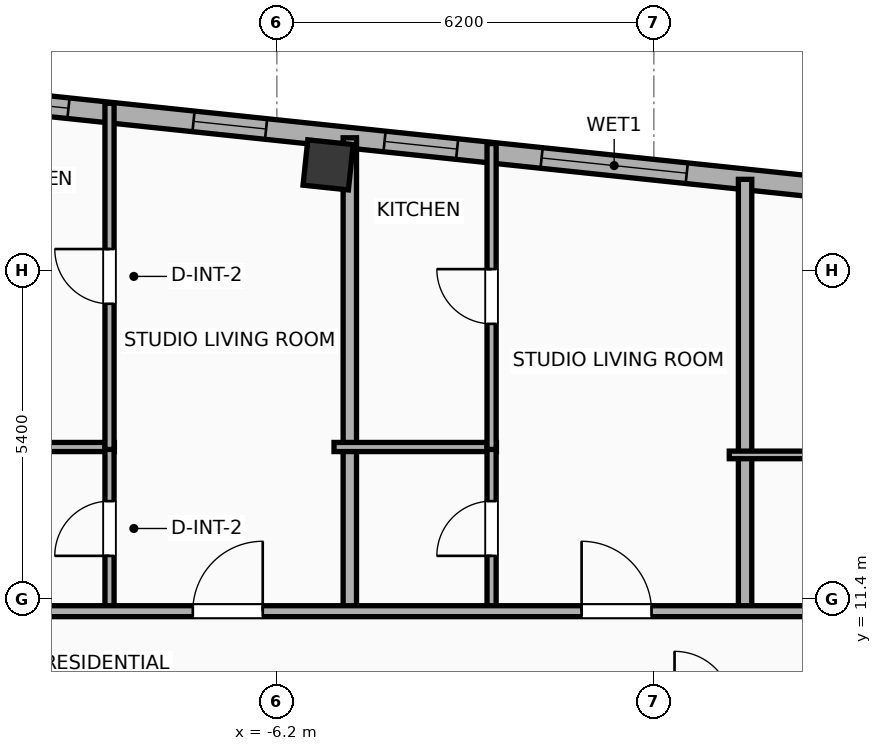
"""IFC4 building model, lengths in metres.
Left out: names, types, materials, properties, quantities, classifications, styles, units other than length and angle.
Written with IfcOpenShell. Run it as: python <this file> out.ifc"""

import sys

from ifc_helpers import new_model, si_unit, direction, frame, frame_2d, origin, origin_2d, place, context, subcontext, project, spatial, rectangle, hollow_rectangle, extrude, element, fill, save


model = new_model("IFC4")
c1 = context("Model", 3, precision=1e-05, world=origin(), true_north=direction((0.0, 1.0)))
c2 = subcontext(c1, "Body", "Model", "MODEL_VIEW")
j1 = project(units=[si_unit("LENGTHUNIT", "METRE"), si_unit("PLANEANGLEUNIT", "RADIAN")], contexts=[c1])
p1 = place(None, origin())
s1 = spatial("IfcSite", under=j1, at=p1, CompositionType="ELEMENT")
p2 = place(p1, origin())
s2 = spatial("IfcBuilding", under=s1, at=p2, CompositionType="ELEMENT")
p3 = place(p2, frame((0.0, 0.0, 287.3)))
s3 = spatial("IfcBuildingStorey", under=s2, at=p3, CompositionType="ELEMENT", Elevation=287.3)
p4 = place(p3, frame((-5.357, 18.54, 0.0), z_axis=(0.0, 0.0, 1.0), x_axis=(0.994521895368, -0.104528463268, 0.0)))
e1 = element("IfcColumn", 1, at=p4, inside=s3, PredefinedType="COLUMN", context=c2, shape_type="SweptSolid", body=[
    extrude(hollow_rectangle(XDim=0.75, YDim=0.75, WallThickness=0.025, at=origin_2d()), origin(), (0.0, 0.0, 1.0), 3.9),
])
p5 = place(p3, frame((-23.908, 20.972, 0.0), z_axis=(0.0, 0.0, 1.0), x_axis=(0.994521888554, -0.104528528102, 0.0)))
e2 = element("IfcWall", 2, at=p5, inside=s3, PredefinedType="ELEMENTEDWALL", context=c2, shape_type="SweptSolid", body=[
    extrude(rectangle(XDim=46.766, YDim=0.34, at=frame_2d((23.383, 0.0))), origin(), (0.0, 0.0, 1.0), 3.635),
])
p6 = place(p5, frame((22.183, 0.0, 0.75)))
e3 = element("IfcOpeningElement", 3, at=p6, cuts=e2, PredefinedType="OPENING", context=c2, shape_type="SweptSolid", body=[
    extrude(rectangle(XDim=2.4, YDim=2.1, at=frame_2d((1.2, 1.05))), frame((0.0, 0.18, 0.0), z_axis=(0.0, -1.0, 0.0), x_axis=(1.0, 0.0, 0.0)), (0.0, 0.0, 1.0), 0.36),
])
p7 = place(p5, frame((4.49, 0.0, 0.75)))
e4 = element("IfcOpeningElement", 4, at=p7, cuts=e2, PredefinedType="OPENING", context=c2, shape_type="SweptSolid", body=[
    extrude(rectangle(XDim=1.2, YDim=2.05, at=frame_2d((0.6, 1.025))), frame((0.0, 0.18, 0.0), z_axis=(0.0, -1.0, 0.0), x_axis=(1.0, 0.0, 0.0)), (0.0, 0.0, 1.0), 0.36),
])
p8 = place(p5, frame((1.657, 0.0, 0.75)))
e5 = element("IfcOpeningElement", 5, at=p8, cuts=e2, PredefinedType="OPENING", context=c2, shape_type="SweptSolid", body=[
    extrude(rectangle(XDim=1.2, YDim=2.05, at=frame_2d((0.6, 1.025))), frame((0.0, 0.18, 0.0), z_axis=(0.0, -1.0, 0.0), x_axis=(1.0, 0.0, 0.0)), (0.0, 0.0, 1.0), 0.36),
])
p9 = place(p5, frame((9.885, 0.0, 0.75)))
e6 = element("IfcOpeningElement", 6, at=p9, cuts=e2, PredefinedType="OPENING", context=c2, shape_type="SweptSolid", body=[
    extrude(rectangle(XDim=1.2, YDim=2.05, at=frame_2d((0.6, 1.025))), frame((0.0, 0.18, 0.0), z_axis=(0.0, -1.0, 0.0), x_axis=(1.0, 0.0, 0.0)), (0.0, 0.0, 1.0), 0.36),
])
p10 = place(p5, frame((16.427, 0.0, 0.75)))
e7 = element("IfcOpeningElement", 7, at=p10, cuts=e2, PredefinedType="OPENING", context=c2, shape_type="SweptSolid", body=[
    extrude(rectangle(XDim=1.2, YDim=2.05, at=frame_2d((0.6, 1.025))), frame((0.0, 0.18, 0.0), z_axis=(0.0, -1.0, 0.0), x_axis=(1.0, 0.0, 0.0)), (0.0, 0.0, 1.0), 0.36),
])
p11 = place(p5, frame((13.159, 0.0, 0.75)))
e8 = element("IfcOpeningElement", 8, at=p11, cuts=e2, PredefinedType="OPENING", context=c2, shape_type="SweptSolid", body=[
    extrude(rectangle(XDim=1.2, YDim=2.05, at=frame_2d((0.6, 1.025))), frame((0.0, 0.18, 0.0), z_axis=(0.0, -1.0, 0.0), x_axis=(1.0, 0.0, 0.0)), (0.0, 0.0, 1.0), 0.36),
])
p12 = place(p5, frame((19.586, 0.0, 0.75)))
e9 = element("IfcOpeningElement", 9, at=p12, cuts=e2, PredefinedType="OPENING", context=c2, shape_type="SweptSolid", body=[
    extrude(rectangle(XDim=1.2, YDim=2.05, at=frame_2d((0.6, 1.025))), frame((0.0, 0.18, 0.0), z_axis=(0.0, -1.0, 0.0), x_axis=(1.0, 0.0, 0.0)), (0.0, 0.0, 1.0), 0.36),
])
p13 = place(p5, frame((28.687, 0.0, 0.75)))
e10 = element("IfcOpeningElement", 10, at=p13, cuts=e2, PredefinedType="OPENING", context=c2, shape_type="SweptSolid", body=[
    extrude(rectangle(XDim=1.2, YDim=2.05, at=frame_2d((0.6, 1.025))), frame((0.0, 0.18, 0.0), z_axis=(0.0, -1.0, 0.0), x_axis=(1.0, 0.0, 0.0)), (0.0, 0.0, 1.0), 0.36),
])
p14 = place(p5, frame((34.0, 0.0, 0.75)))
e11 = element("IfcOpeningElement", 11, at=p14, cuts=e2, PredefinedType="OPENING", context=c2, shape_type="SweptSolid", body=[
    extrude(rectangle(XDim=1.2, YDim=2.05, at=frame_2d((0.6, 1.025))), frame((0.0, 0.18, 0.0), z_axis=(0.0, -1.0, 0.0), x_axis=(1.0, 0.0, 0.0)), (0.0, 0.0, 1.0), 0.36),
])
p15 = place(p5, frame((38.775, 0.0, 0.75)))
e12 = element("IfcOpeningElement", 12, at=p15, cuts=e2, PredefinedType="OPENING", context=c2, shape_type="SweptSolid", body=[
    extrude(rectangle(XDim=1.2, YDim=2.05, at=frame_2d((0.6, 1.025))), frame((0.0, 0.18, 0.0), z_axis=(0.0, -1.0, 0.0), x_axis=(1.0, 0.0, 0.0)), (0.0, 0.0, 1.0), 0.36),
])
p16 = place(p5, frame((41.836, 0.0, 0.75)))
e13 = element("IfcOpeningElement", 13, at=p16, cuts=e2, PredefinedType="OPENING", context=c2, shape_type="SweptSolid", body=[
    extrude(rectangle(XDim=1.2, YDim=2.05, at=frame_2d((0.6, 1.025))), frame((0.0, 0.18, 0.0), z_axis=(0.0, -1.0, 0.0), x_axis=(1.0, 0.0, 0.0)), (0.0, 0.0, 1.0), 0.36),
])
p17 = place(p5, frame((44.206, 0.0, 0.75)))
e14 = element("IfcOpeningElement", 14, at=p17, cuts=e2, PredefinedType="OPENING", context=c2, shape_type="SweptSolid", body=[
    extrude(rectangle(XDim=1.2, YDim=2.05, at=frame_2d((0.6, 1.025))), frame((0.0, 0.18, 0.0), z_axis=(0.0, -1.0, 0.0), x_axis=(1.0, 0.0, 0.0)), (0.0, 0.0, 1.0), 0.36),
])
p18 = place(p3, frame((-11.76, 13.9, 0.0), z_axis=(0.0, 0.0, 1.0), x_axis=(1.0, 0.0, 0.0)))
e15 = element("IfcWall", 15, at=p18, inside=s3, PredefinedType="PLUMBINGWALL", context=c2, shape_type="SweptSolid", body=[
    extrude(rectangle(XDim=2.888, YDim=0.15, at=frame_2d((1.444, 0.0))), origin(), (0.0, 0.0, 1.0), 3.635),
])
p19 = place(p3, frame((-8.952, 11.18, 0.0), z_axis=(0.0, 0.0, 1.0), x_axis=(0.0, 1.0, 0.0)))
e16 = element("IfcWall", 16, at=p19, inside=s3, PredefinedType="PLUMBINGWALL", context=c2, shape_type="SweptSolid", body=[
    extrude(rectangle(XDim=2.76, YDim=0.15, at=frame_2d((1.38, 0.0))), origin(), (0.0, 0.0, 1.0), 3.635),
])
p20 = place(p19, frame((0.93, 0.0, 0.0)))
e17 = element("IfcOpeningElement", 17, at=p20, cuts=e16, PredefinedType="OPENING", context=c2, shape_type="SweptSolid", body=[
    extrude(rectangle(XDim=0.9, YDim=2.05, at=frame_2d((0.45, 1.025))), frame((0.0, 0.085, 0.0), z_axis=(0.0, -1.0, 0.0), x_axis=(1.0, 0.0, 0.0)), (0.0, 0.0, 1.0), 0.17),
])
p21 = place(p3, frame((-8.952, 13.86, 0.0), z_axis=(0.0, 0.0, 1.0), x_axis=(0.0, 1.0, 0.0)))
e18 = element("IfcWall", 18, at=p21, inside=s3, PredefinedType="PLUMBINGWALL", context=c2, shape_type="SweptSolid", body=[
    extrude(rectangle(XDim=5.691, YDim=0.15, at=frame_2d((2.845, 0.0))), origin(), (0.0, 0.0, 1.0), 3.635),
])
p22 = place(p21, frame((2.396, 0.0, 0.0)))
e19 = element("IfcOpeningElement", 19, at=p22, cuts=e18, PredefinedType="OPENING", context=c2, shape_type="SweptSolid", body=[
    extrude(rectangle(XDim=0.9, YDim=2.05, at=frame_2d((0.45, 1.025))), frame((0.0, 0.085, 0.0), z_axis=(0.0, -1.0, 0.0), x_axis=(1.0, 0.0, 0.0)), (0.0, 0.0, 1.0), 0.17),
])
p23 = place(p3, frame((-5.0, 11.12, 0.0), z_axis=(0.0, 0.0, 1.0), x_axis=(0.0, 1.0, 0.0)))
e20 = element("IfcWall", 20, at=p23, inside=s3, PredefinedType="PARTITIONING", context=c2, shape_type="SweptSolid", body=[
    extrude(rectangle(XDim=7.865, YDim=0.22, at=frame_2d((3.932, 0.0))), origin(), (0.0, 0.0, 1.0), 3.075),
])
p24 = place(p3, frame((-5.26, 13.9, 0.0), z_axis=(0.0, 0.0, 1.0), x_axis=(1.0, 0.0, 0.0)))
e21 = element("IfcWall", 21, at=p24, inside=s3, PredefinedType="PLUMBINGWALL", context=c2, shape_type="SweptSolid", body=[
    extrude(rectangle(XDim=2.671, YDim=0.15, at=frame_2d((1.335, 0.0))), origin(), (0.0, 0.0, 1.0), 3.635),
])
p25 = place(p3, frame((-2.669, 11.18, 0.0), z_axis=(0.0, 0.0, 1.0), x_axis=(0.0, 1.0, 0.0)))
e22 = element("IfcWall", 22, at=p25, inside=s3, PredefinedType="PLUMBINGWALL", context=c2, shape_type="SweptSolid", body=[
    extrude(rectangle(XDim=2.76, YDim=0.15, at=frame_2d((1.38, 0.0))), origin(), (0.0, 0.0, 1.0), 3.635),
])
p26 = place(p25, frame((0.93, 0.0, 0.0)))
e23 = element("IfcOpeningElement", 23, at=p26, cuts=e22, PredefinedType="OPENING", context=c2, shape_type="SweptSolid", body=[
    extrude(rectangle(XDim=0.9, YDim=2.05, at=frame_2d((0.45, 1.025))), frame((0.0, 0.085, 0.0), z_axis=(0.0, -1.0, 0.0), x_axis=(1.0, 0.0, 0.0)), (0.0, 0.0, 1.0), 0.17),
])
p27 = place(p3, frame((-2.669, 13.86, 0.0), z_axis=(0.0, 0.0, 1.0), x_axis=(0.0, 1.0, 0.0)))
e24 = element("IfcWall", 24, at=p27, inside=s3, PredefinedType="PLUMBINGWALL", context=c2, shape_type="SweptSolid", body=[
    extrude(rectangle(XDim=5.031, YDim=0.15, at=frame_2d((2.515, 0.0))), origin(), (0.0, 0.0, 1.0), 3.635),
])
p28 = place(p27, frame((2.065, 0.0, 0.0)))
e25 = element("IfcOpeningElement", 25, at=p28, cuts=e24, PredefinedType="OPENING", context=c2, shape_type="SweptSolid", body=[
    extrude(rectangle(XDim=0.9, YDim=2.05, at=frame_2d((0.45, 1.025))), frame((0.0, 0.085, 0.0), z_axis=(0.0, -1.0, 0.0), x_axis=(1.0, 0.0, 0.0)), (0.0, 0.0, 1.0), 0.17),
])
p29 = place(p3, frame((1.5, 11.12, 0.0), z_axis=(0.0, 0.0, 1.0), x_axis=(0.0, 1.0, 0.0)))
e26 = element("IfcWall", 26, at=p29, inside=s3, PredefinedType="PARTITIONING", context=c2, shape_type="SweptSolid", body=[
    extrude(rectangle(XDim=7.182, YDim=0.22, at=frame_2d((3.591, 0.0))), origin(), (0.0, 0.0, 1.0), 3.635),
])
p30 = place(p3, frame((1.24, 13.77, 0.0), z_axis=(0.0, 0.0, 1.0), x_axis=(1.0, 0.0, 0.0)))
e27 = element("IfcWall", 27, at=p30, inside=s3, PredefinedType="PARTITIONING", context=c2, shape_type="SweptSolid", body=[
    extrude(rectangle(XDim=2.63, YDim=0.125, at=frame_2d((1.315, 0.0))), origin(), (0.0, 0.0, 1.0), 3.635),
])
p31 = place(p3, frame((-28.401, 11.2, 0.0), z_axis=(0.0, 0.0, 1.0), x_axis=(1.0, 0.0, 0.0)))
e28 = element("IfcWall", 28, at=p31, inside=s3, PredefinedType="PARTITIONING", context=c2, shape_type="SweptSolid", body=[
    extrude(rectangle(XDim=53.956, YDim=0.18, at=frame_2d((26.978, 0.0))), origin(), (0.0, 0.0, 1.0), 3.635),
])
p32 = place(p31, frame((2.512, 0.0, 0.0)))
e29 = element("IfcOpeningElement", 29, at=p32, cuts=e28, PredefinedType="OPENING", context=c2, shape_type="SweptSolid", body=[
    extrude(rectangle(XDim=0.9, YDim=2.05, at=frame_2d((0.45, 1.025))), frame((0.0, 0.1, 0.0), z_axis=(0.0, -1.0, 0.0), x_axis=(1.0, 0.0, 0.0)), (0.0, 0.0, 1.0), 0.2),
])
p33 = place(p31, frame((8.948, 0.0, 0.0)))
e30 = element("IfcOpeningElement", 30, at=p33, cuts=e28, PredefinedType="OPENING", context=c2, shape_type="SweptSolid", body=[
    extrude(rectangle(XDim=1.15, YDim=2.05, at=frame_2d((0.575, 1.025))), frame((0.0, 0.1, 0.0), z_axis=(0.0, -1.0, 0.0), x_axis=(1.0, 0.0, 0.0)), (0.0, 0.0, 1.0), 0.2),
])
p34 = place(p31, frame((13.821, 0.0, 0.0)))
e31 = element("IfcOpeningElement", 31, at=p34, cuts=e28, PredefinedType="OPENING", context=c2, shape_type="SweptSolid", body=[
    extrude(rectangle(XDim=0.9, YDim=2.05, at=frame_2d((0.45, 1.025))), frame((0.0, 0.1, 0.0), z_axis=(0.0, -1.0, 0.0), x_axis=(1.0, 0.0, 0.0)), (0.0, 0.0, 1.0), 0.2),
])
p35 = place(p31, frame((20.818, 0.0, 0.0)))
e32 = element("IfcOpeningElement", 32, at=p35, cuts=e28, PredefinedType="OPENING", context=c2, shape_type="SweptSolid", body=[
    extrude(rectangle(XDim=1.15, YDim=2.05, at=frame_2d((0.575, 1.025))), frame((0.0, 0.1, 0.0), z_axis=(0.0, -1.0, 0.0), x_axis=(1.0, 0.0, 0.0)), (0.0, 0.0, 1.0), 0.2),
])
p36 = place(p31, frame((27.212, 0.0, 0.0)))
e33 = element("IfcOpeningElement", 33, at=p36, cuts=e28, PredefinedType="OPENING", context=c2, shape_type="SweptSolid", body=[
    extrude(rectangle(XDim=1.15, YDim=2.05, at=frame_2d((0.575, 1.025))), frame((0.0, 0.1, 0.0), z_axis=(0.0, -1.0, 0.0), x_axis=(1.0, 0.0, 0.0)), (0.0, 0.0, 1.0), 0.2),
])
p37 = place(p31, frame((32.576, 0.0, 0.0)))
e34 = element("IfcOpeningElement", 34, at=p37, cuts=e28, PredefinedType="OPENING", context=c2, shape_type="SweptSolid", body=[
    extrude(rectangle(XDim=0.9, YDim=2.05, at=frame_2d((0.45, 1.025))), frame((0.0, 0.1, 0.0), z_axis=(0.0, -1.0, 0.0), x_axis=(1.0, 0.0, 0.0)), (0.0, 0.0, 1.0), 0.2),
])
p38 = place(p31, frame((38.576, 0.0, 0.0)))
e35 = element("IfcOpeningElement", 35, at=p38, cuts=e28, PredefinedType="OPENING", context=c2, shape_type="SweptSolid", body=[
    extrude(rectangle(XDim=0.9, YDim=2.05, at=frame_2d((0.45, 1.025))), frame((0.0, 0.1, 0.0), z_axis=(0.0, -1.0, 0.0), x_axis=(1.0, 0.0, 0.0)), (0.0, 0.0, 1.0), 0.2),
])
p39 = place(p31, frame((43.102, 0.0, 0.0)))
e36 = element("IfcOpeningElement", 36, at=p39, cuts=e28, PredefinedType="OPENING", context=c2, shape_type="SweptSolid", body=[
    extrude(rectangle(XDim=1.15, YDim=2.05, at=frame_2d((0.575, 1.025))), frame((0.0, 0.1, 0.0), z_axis=(0.0, -1.0, 0.0), x_axis=(1.0, 0.0, 0.0)), (0.0, 0.0, 1.0), 0.2),
])
p40 = place(p31, frame((50.732, 0.0, 0.0)))
e37 = element("IfcOpeningElement", 37, at=p40, cuts=e28, PredefinedType="OPENING", context=c2, shape_type="SweptSolid", body=[
    extrude(rectangle(XDim=0.9, YDim=2.05, at=frame_2d((0.45, 1.025))), frame((0.0, 0.1, 0.0), z_axis=(0.0, -1.0, 0.0), x_axis=(1.0, 0.0, 0.0)), (0.0, 0.0, 1.0), 0.2),
])
p41 = place(p6, origin())
e38 = element("IfcWindow", 38, at=p41, inside=s3, PartitioningType="SINGLE_PANEL", PredefinedType="WINDOW", context=c2, shape_type="SweptSolid", body=[
    extrude(rectangle(XDim=2.4, YDim=2.1, at=frame_2d((1.2, 1.05))), frame((0.0, 0.03, 0.0), z_axis=(0.0, -1.0, 0.0), x_axis=(1.0, 0.0, 0.0)), (0.0, 0.0, 1.0), 0.06),
])
fill(e3, e38)
p42 = place(p10, origin())
e39 = element("IfcWindow", 39, at=p42, inside=s3, PartitioningType="SINGLE_PANEL", PredefinedType="WINDOW", context=c2, shape_type="SweptSolid", body=[
    extrude(rectangle(XDim=1.2, YDim=2.05, at=frame_2d((0.6, 1.025))), frame((0.0, 0.03, 0.0), z_axis=(0.0, -1.0, 0.0), x_axis=(1.0, 0.0, 0.0)), (0.0, 0.0, 1.0), 0.06),
])
fill(e7, e39)
p43 = place(p11, origin())
e40 = element("IfcWindow", 40, at=p43, inside=s3, PartitioningType="SINGLE_PANEL", PredefinedType="WINDOW", context=c2, shape_type="SweptSolid", body=[
    extrude(rectangle(XDim=1.2, YDim=2.05, at=frame_2d((0.6, 1.025))), frame((0.0, 0.03, 0.0), z_axis=(0.0, -1.0, 0.0), x_axis=(1.0, 0.0, 0.0)), (0.0, 0.0, 1.0), 0.06),
])
fill(e8, e40)
p44 = place(p12, origin())
e41 = element("IfcWindow", 41, at=p44, inside=s3, PartitioningType="SINGLE_PANEL", PredefinedType="WINDOW", context=c2, shape_type="SweptSolid", body=[
    extrude(rectangle(XDim=1.2, YDim=2.05, at=frame_2d((0.6, 1.025))), frame((0.0, 0.03, 0.0), z_axis=(0.0, -1.0, 0.0), x_axis=(1.0, 0.0, 0.0)), (0.0, 0.0, 1.0), 0.06),
])
fill(e9, e41)
p45 = place(p20, origin())
e42 = element("IfcDoor", 42, at=p45, inside=s3, OperationType="SINGLE_SWING_LEFT", PredefinedType="DOOR", context=c2, shape_type="SweptSolid", body=[
    extrude(rectangle(XDim=0.9, YDim=2.05, at=frame_2d((0.45, 1.025))), frame((0.0, 0.025, 0.0), z_axis=(0.0, -1.0, 0.0), x_axis=(1.0, 0.0, 0.0)), (0.0, 0.0, 1.0), 0.05),
])
fill(e17, e42)
p46 = place(p22, origin())
e43 = element("IfcDoor", 43, at=p46, inside=s3, OperationType="SINGLE_SWING_RIGHT", PredefinedType="DOOR", context=c2, shape_type="SweptSolid", body=[
    extrude(rectangle(XDim=0.9, YDim=2.05, at=frame_2d((0.45, 1.025))), frame((0.0, 0.025, 0.0), z_axis=(0.0, -1.0, 0.0), x_axis=(1.0, 0.0, 0.0)), (0.0, 0.0, 1.0), 0.05),
])
fill(e19, e43)
p47 = place(p26, origin())
e44 = element("IfcDoor", 44, at=p47, inside=s3, OperationType="SINGLE_SWING_LEFT", PredefinedType="DOOR", context=c2, shape_type="SweptSolid", body=[
    extrude(rectangle(XDim=0.9, YDim=2.05, at=frame_2d((0.45, 1.025))), frame((0.0, 0.025, 0.0), z_axis=(0.0, -1.0, 0.0), x_axis=(1.0, 0.0, 0.0)), (0.0, 0.0, 1.0), 0.05),
])
fill(e23, e44)
p48 = place(p28, origin())
e45 = element("IfcDoor", 45, at=p48, inside=s3, OperationType="SINGLE_SWING_RIGHT", PredefinedType="DOOR", context=c2, shape_type="SweptSolid", body=[
    extrude(rectangle(XDim=0.9, YDim=2.05, at=frame_2d((0.45, 1.025))), frame((0.0, 0.025, 0.0), z_axis=(0.0, -1.0, 0.0), x_axis=(1.0, 0.0, 0.0)), (0.0, 0.0, 1.0), 0.05),
])
fill(e25, e45)
p49 = place(p35, origin())
e46 = element("IfcDoor", 46, at=p49, inside=s3, OperationType="SINGLE_SWING_RIGHT", PredefinedType="DOOR", context=c2, shape_type="SweptSolid", body=[
    extrude(rectangle(XDim=1.15, YDim=2.05, at=frame_2d((0.575, 1.025))), frame((0.0, 0.025, 0.0), z_axis=(0.0, -1.0, 0.0), x_axis=(1.0, 0.0, 0.0)), (0.0, 0.0, 1.0), 0.05),
])
fill(e32, e46)
p50 = place(p36, origin())
e47 = element("IfcDoor", 47, at=p50, inside=s3, OperationType="SINGLE_SWING_LEFT", PredefinedType="DOOR", context=c2, shape_type="SweptSolid", body=[
    extrude(rectangle(XDim=1.15, YDim=2.05, at=frame_2d((0.575, 1.025))), frame((0.0, 0.025, 0.0), z_axis=(0.0, -1.0, 0.0), x_axis=(1.0, 0.0, 0.0)), (0.0, 0.0, 1.0), 0.05),
])
fill(e33, e47)
save(model, sys.argv[1])
